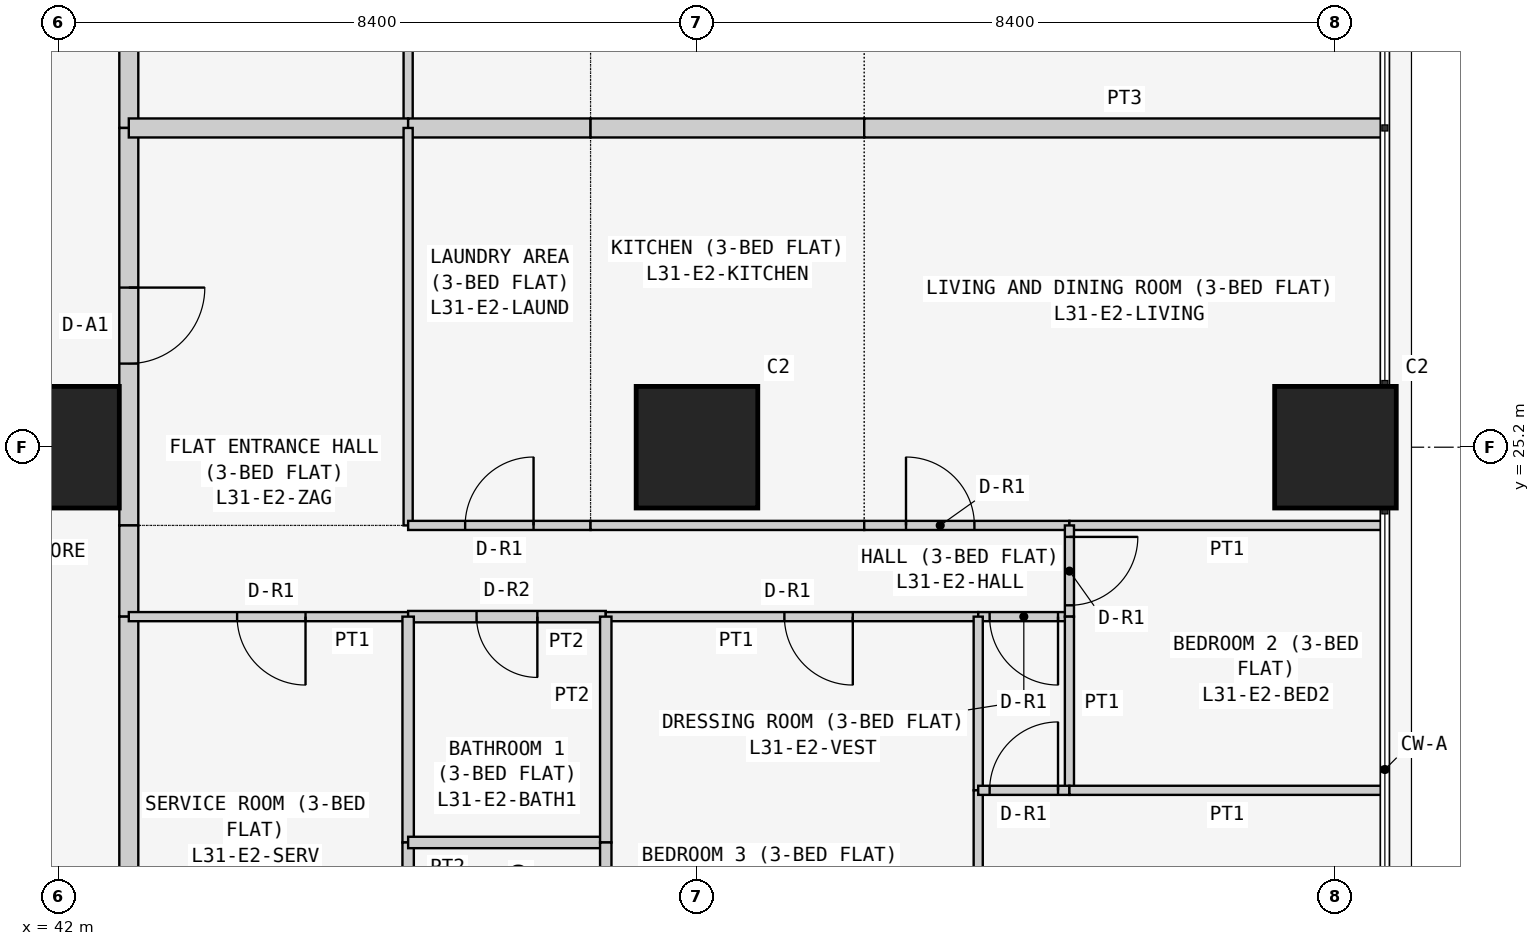
"""IFC4 building model, lengths in metres.
Left out: names, types, materials, properties, quantities, classifications, styles, units other than length and angle.
Written with IfcOpenShell. Run it as: python <this file> out.ifc"""

import sys

from ifc_helpers import new_model, si_unit, direction, frame, frame_2d, origin, origin_2d, place, context, subcontext, project, spatial, rectangle, extrude, element, fill, save


model = new_model("IFC4")
c1 = context("Model", 3, precision=1e-05, world=origin(), true_north=direction((0.0, 1.0)))
c2 = subcontext(c1, "Body", "Model", "MODEL_VIEW")
j1 = project(units=[si_unit("LENGTHUNIT", "METRE"), si_unit("PLANEANGLEUNIT", "RADIAN")], contexts=[c1])
p1 = place(None, origin())
s1 = spatial("IfcSite", under=j1, at=p1, CompositionType="ELEMENT")
p2 = place(p1, origin())
s2 = spatial("IfcBuilding", under=s1, at=p2, CompositionType="ELEMENT")
p3 = place(p2, frame((0.0, 0.0, 123.3)))
s3 = spatial("IfcBuildingStorey", under=s2, at=p3, CompositionType="ELEMENT", Elevation=123.3)
for number, where, z_axis, x_axis in (
    (1, (42.0, 25.2, 0.0), (0.0, 0.0, 1.0), (1.0, 0.0, 0.0)),
    (2, (50.4, 25.2, 0.0), (0.0, 0.0, 1.0), (1.0, 0.0, 0.0)),
    (3, (58.8, 25.2, 0.0), (0.0, 0.0, 1.0), (1.0, 0.0, 0.0)),
):
    element("IfcColumn", number, at=place(p3, frame(where, z_axis=z_axis, x_axis=x_axis)), inside=s3, PredefinedType="COLUMN", context=c2, shape_type="SweptSolid", body=[
        extrude(rectangle(XDim=1.6, YDim=1.6, at=origin_2d()), origin(), (0.0, 0.0, 1.0), 3.6),
    ])
p4 = place(p3, frame((42.925, 34.629, 0.0), z_axis=(0.0, 0.0, 1.0), x_axis=(0.0, -1.0, 0.0)))
e4 = element("IfcWall", 4, at=p4, inside=s3, PredefinedType="PARTITIONING", context=c2, shape_type="SweptSolid", body=[
    extrude(rectangle(XDim=5.229, YDim=0.25, at=frame_2d((2.615, 0.0))), origin(), (0.0, 0.0, 1.0), 3.45),
])
p5 = place(p4, frame((2.129, 0.0, 0.0)))
e5 = element("IfcOpeningElement", 5, at=p5, cuts=e4, PredefinedType="OPENING", context=c2, shape_type="SweptSolid", body=[
    extrude(rectangle(XDim=1.0, YDim=2.1, at=frame_2d((0.5, 1.05))), frame((0.0, 0.135, 0.0), z_axis=(0.0, -1.0, 0.0), x_axis=(1.0, 0.0, 0.0)), (0.0, 0.0, 1.0), 0.27),
])
p6 = place(p3, frame((42.925, 29.4, 0.0), z_axis=(0.0, 0.0, 1.0), x_axis=(0.0, -1.0, 0.0)))
e6 = element("IfcWall", 6, at=p6, inside=s3, PredefinedType="PARTITIONING", context=c2, shape_type="SweptSolid", body=[
    extrude(rectangle(XDim=5.229, YDim=0.25, at=frame_2d((2.615, 0.0))), origin(), (0.0, 0.0, 1.0), 3.45),
])
p7 = place(p6, frame((2.1, 0.0, 0.0)))
e7 = element("IfcOpeningElement", 7, at=p7, cuts=e6, PredefinedType="OPENING", context=c2, shape_type="SweptSolid", body=[
    extrude(rectangle(XDim=1.0, YDim=2.1, at=frame_2d((0.5, 1.05))), frame((0.0, 0.135, 0.0), z_axis=(0.0, -1.0, 0.0), x_axis=(1.0, 0.0, 0.0)), (0.0, 0.0, 1.0), 0.27),
])
p8 = place(p3, frame((42.925, 24.171, 0.0), z_axis=(0.0, 0.0, 1.0), x_axis=(0.0, -1.0, 0.0)))
e8 = element("IfcWall", 8, at=p8, inside=s3, PredefinedType="PARTITIONING", context=c2, shape_type="SweptSolid", body=[
    extrude(rectangle(XDim=1.2, YDim=0.25, at=frame_2d((0.6, 0.0))), origin(), (0.0, 0.0, 1.0), 3.45),
])
p9 = place(p3, frame((42.925, 22.971, 0.0), z_axis=(0.0, 0.0, 1.0), x_axis=(0.0, -1.0, 0.0)))
e9 = element("IfcWall", 9, at=p9, inside=s3, PredefinedType="PARTITIONING", context=c2, shape_type="SweptSolid", body=[
    extrude(rectangle(XDim=6.871, YDim=0.25, at=frame_2d((3.436, 0.0))), origin(), (0.0, 0.0, 1.0), 3.45),
])
p10 = place(p3, frame((46.6, 29.4, 0.0), z_axis=(0.0, 0.0, 1.0), x_axis=(0.0, 1.0, 0.0)))
e10 = element("IfcWall", 10, at=p10, inside=s3, PredefinedType="PARTITIONING", context=c2, shape_type="SweptSolid", body=[
    extrude(rectangle(XDim=5.229, YDim=0.12, at=frame_2d((2.615, 0.0))), origin(), (0.0, 0.0, 1.0), 3.45),
])
p11 = place(p3, frame((42.925, 29.4, 0.0), z_axis=(0.0, 0.0, 1.0), x_axis=(1.0, 0.0, 0.0)))
e11 = element("IfcWall", 11, at=p11, inside=s3, PredefinedType="PARTITIONING", context=c2, shape_type="SweptSolid", body=[
    extrude(rectangle(XDim=3.675, YDim=0.25, at=frame_2d((1.837, 0.0))), origin(), (0.0, 0.0, 1.0), 3.45),
])
p12 = place(p3, frame((46.6, 29.4, 0.0), z_axis=(0.0, 0.0, 1.0), x_axis=(1.0, 0.0, 0.0)))
e12 = element("IfcWall", 12, at=p12, inside=s3, PredefinedType="PARTITIONING", context=c2, shape_type="SweptSolid", body=[
    extrude(rectangle(XDim=2.4, YDim=0.25, at=frame_2d((1.2, 0.0))), origin(), (0.0, 0.0, 1.0), 3.45),
])
p13 = place(p3, frame((49.0, 29.4, 0.0), z_axis=(0.0, 0.0, 1.0), x_axis=(1.0, 0.0, 0.0)))
e13 = element("IfcWall", 13, at=p13, inside=s3, PredefinedType="PARTITIONING", context=c2, shape_type="SweptSolid", body=[
    extrude(rectangle(XDim=3.6, YDim=0.25, at=frame_2d((1.8, 0.0))), origin(), (0.0, 0.0, 1.0), 3.45),
])
p14 = place(p3, frame((52.6, 29.4, 0.0), z_axis=(0.0, 0.0, 1.0), x_axis=(1.0, 0.0, 0.0)))
e14 = element("IfcWall", 14, at=p14, inside=s3, PredefinedType="PARTITIONING", context=c2, shape_type="SweptSolid", body=[
    extrude(rectangle(XDim=6.85, YDim=0.25, at=frame_2d((3.425, 0.0))), origin(), (0.0, 0.0, 1.0), 3.45),
])
p15 = place(p3, frame((46.6, 29.4, 0.0), z_axis=(0.0, 0.0, 1.0), x_axis=(0.0, -1.0, 0.0)))
e15 = element("IfcWall", 15, at=p15, inside=s3, PredefinedType="PARTITIONING", context=c2, shape_type="SweptSolid", body=[
    extrude(rectangle(XDim=5.229, YDim=0.12, at=frame_2d((2.615, 0.0))), origin(), (0.0, 0.0, 1.0), 3.45),
])
p16 = place(p3, frame((49.0, 24.171, 0.0), z_axis=(0.0, 0.0, 1.0), x_axis=(-1.0, 0.0, 0.0)))
e16 = element("IfcWall", 16, at=p16, inside=s3, PredefinedType="PARTITIONING", context=c2, shape_type="SweptSolid", body=[
    extrude(rectangle(XDim=2.4, YDim=0.12, at=frame_2d((1.2, 0.0))), origin(), (0.0, 0.0, 1.0), 3.45),
])
p17 = place(p16, frame((0.75, 0.0, 0.0)))
e17 = element("IfcOpeningElement", 17, at=p17, cuts=e16, PredefinedType="OPENING", context=c2, shape_type="SweptSolid", body=[
    extrude(rectangle(XDim=0.9, YDim=2.1, at=frame_2d((0.45, 1.05))), frame((0.0, 0.07, 0.0), z_axis=(0.0, -1.0, 0.0), x_axis=(1.0, 0.0, 0.0)), (0.0, 0.0, 1.0), 0.14),
])
p18 = place(p3, frame((52.6, 24.171, 0.0), z_axis=(0.0, 0.0, 1.0), x_axis=(-1.0, 0.0, 0.0)))
e18 = element("IfcWall", 18, at=p18, inside=s3, PredefinedType="PARTITIONING", context=c2, shape_type="SweptSolid", body=[
    extrude(rectangle(XDim=3.6, YDim=0.12, at=frame_2d((1.8, 0.0))), origin(), (0.0, 0.0, 1.0), 3.45),
])
p19 = place(p3, frame((55.3, 24.171, 0.0), z_axis=(0.0, 0.0, 1.0), x_axis=(-1.0, 0.0, 0.0)))
e19 = element("IfcWall", 19, at=p19, inside=s3, PredefinedType="PARTITIONING", context=c2, shape_type="SweptSolid", body=[
    extrude(rectangle(XDim=2.7, YDim=0.12, at=frame_2d((1.35, 0.0))), origin(), (0.0, 0.0, 1.0), 3.45),
])
p20 = place(p19, frame((1.25, 0.0, 0.0)))
e20 = element("IfcOpeningElement", 20, at=p20, cuts=e19, PredefinedType="OPENING", context=c2, shape_type="SweptSolid", body=[
    extrude(rectangle(XDim=0.9, YDim=2.1, at=frame_2d((0.45, 1.05))), frame((0.0, 0.07, 0.0), z_axis=(0.0, -1.0, 0.0), x_axis=(1.0, 0.0, 0.0)), (0.0, 0.0, 1.0), 0.14),
])
p21 = place(p3, frame((59.45, 24.171, 0.0), z_axis=(0.0, 0.0, 1.0), x_axis=(-1.0, 0.0, 0.0)))
e21 = element("IfcWall", 21, at=p21, inside=s3, PredefinedType="PARTITIONING", context=c2, shape_type="SweptSolid", body=[
    extrude(rectangle(XDim=4.15, YDim=0.12, at=frame_2d((2.075, 0.0))), origin(), (0.0, 0.0, 1.0), 3.45),
])
p22 = place(p3, frame((46.6, 22.971, 0.0), z_axis=(0.0, 0.0, 1.0), x_axis=(-1.0, 0.0, 0.0)))
e22 = element("IfcWall", 22, at=p22, inside=s3, PredefinedType="PARTITIONING", context=c2, shape_type="SweptSolid", body=[
    extrude(rectangle(XDim=3.675, YDim=0.12, at=frame_2d((1.837, 0.0))), origin(), (0.0, 0.0, 1.0), 3.45),
])
p23 = place(p22, frame((1.35, 0.0, 0.0)))
e23 = element("IfcOpeningElement", 23, at=p23, cuts=e22, PredefinedType="OPENING", context=c2, shape_type="SweptSolid", body=[
    extrude(rectangle(XDim=0.9, YDim=2.1, at=frame_2d((0.45, 1.05))), frame((0.0, 0.07, 0.0), z_axis=(0.0, -1.0, 0.0), x_axis=(1.0, 0.0, 0.0)), (0.0, 0.0, 1.0), 0.14),
])
p24 = place(p3, frame((49.2, 22.971, 0.0), z_axis=(0.0, 0.0, 1.0), x_axis=(-1.0, 0.0, 0.0)))
e24 = element("IfcWall", 24, at=p24, inside=s3, PredefinedType="PARTITIONING", context=c2, shape_type="SweptSolid", body=[
    extrude(rectangle(XDim=2.6, YDim=0.15, at=frame_2d((1.3, 0.0))), origin(), (0.0, 0.0, 1.0), 3.45),
])
p25 = place(p24, frame((0.9, 0.0, 0.0)))
e25 = element("IfcOpeningElement", 25, at=p25, cuts=e24, PredefinedType="OPENING", context=c2, shape_type="SweptSolid", body=[
    extrude(rectangle(XDim=0.8, YDim=2.1, at=frame_2d((0.4, 1.05))), frame((0.0, 0.085, 0.0), z_axis=(0.0, -1.0, 0.0), x_axis=(1.0, 0.0, 0.0)), (0.0, 0.0, 1.0), 0.17),
])
p26 = place(p3, frame((54.1, 22.971, 0.0), z_axis=(0.0, 0.0, 1.0), x_axis=(-1.0, 0.0, 0.0)))
e26 = element("IfcWall", 26, at=p26, inside=s3, PredefinedType="PARTITIONING", context=c2, shape_type="SweptSolid", body=[
    extrude(rectangle(XDim=4.9, YDim=0.12, at=frame_2d((2.45, 0.0))), origin(), (0.0, 0.0, 1.0), 3.45),
])
p27 = place(p26, frame((1.65, 0.0, 0.0)))
e27 = element("IfcOpeningElement", 27, at=p27, cuts=e26, PredefinedType="OPENING", context=c2, shape_type="SweptSolid", body=[
    extrude(rectangle(XDim=0.9, YDim=2.1, at=frame_2d((0.45, 1.05))), frame((0.0, 0.07, 0.0), z_axis=(0.0, -1.0, 0.0), x_axis=(1.0, 0.0, 0.0)), (0.0, 0.0, 1.0), 0.14),
])
p28 = place(p3, frame((55.3, 22.971, 0.0), z_axis=(0.0, 0.0, 1.0), x_axis=(-1.0, 0.0, 0.0)))
e28 = element("IfcWall", 28, at=p28, inside=s3, PredefinedType="PARTITIONING", context=c2, shape_type="SweptSolid", body=[
    extrude(rectangle(XDim=1.2, YDim=0.12, at=frame_2d((0.6, 0.0))), origin(), (0.0, 0.0, 1.0), 3.45),
])
p29 = place(p28, frame((0.15, 0.0, 0.0)))
e29 = element("IfcOpeningElement", 29, at=p29, cuts=e28, PredefinedType="OPENING", context=c2, shape_type="SweptSolid", body=[
    extrude(rectangle(XDim=0.9, YDim=2.1, at=frame_2d((0.45, 1.05))), frame((0.0, 0.07, 0.0), z_axis=(0.0, -1.0, 0.0), x_axis=(1.0, 0.0, 0.0)), (0.0, 0.0, 1.0), 0.14),
])
p30 = place(p3, frame((55.3, 24.171, 0.0), z_axis=(0.0, 0.0, 1.0), x_axis=(0.0, -1.0, 0.0)))
e30 = element("IfcWall", 30, at=p30, inside=s3, PredefinedType="PARTITIONING", context=c2, shape_type="SweptSolid", body=[
    extrude(rectangle(XDim=1.2, YDim=0.12, at=frame_2d((0.6, 0.0))), origin(), (0.0, 0.0, 1.0), 3.45),
])
p31 = place(p30, frame((0.151, 0.0, 0.0)))
e31 = element("IfcOpeningElement", 31, at=p31, cuts=e30, PredefinedType="OPENING", context=c2, shape_type="SweptSolid", body=[
    extrude(rectangle(XDim=0.9, YDim=2.1, at=frame_2d((0.45, 1.05))), frame((0.0, 0.07, 0.0), z_axis=(0.0, -1.0, 0.0), x_axis=(1.0, 0.0, 0.0)), (0.0, 0.0, 1.0), 0.14),
])
p32 = place(p3, frame((46.6, 22.971, 0.0), z_axis=(0.0, 0.0, 1.0), x_axis=(0.0, -1.0, 0.0)))
e32 = element("IfcWall", 32, at=p32, inside=s3, PredefinedType="PARTITIONING", context=c2, shape_type="SweptSolid", body=[
    extrude(rectangle(XDim=2.971, YDim=0.15, at=frame_2d((1.485, 0.0))), origin(), (0.0, 0.0, 1.0), 3.45),
])
p33 = place(p3, frame((46.6, 20.0, 0.0), z_axis=(0.0, 0.0, 1.0), x_axis=(0.0, -1.0, 0.0)))
e33 = element("IfcWall", 33, at=p33, inside=s3, PredefinedType="PARTITIONING", context=c2, shape_type="SweptSolid", body=[
    extrude(rectangle(XDim=3.9, YDim=0.15, at=frame_2d((1.95, 0.0))), origin(), (0.0, 0.0, 1.0), 3.45),
])
p34 = place(p33, frame((1.45, 0.0, 0.0)))
e34 = element("IfcOpeningElement", 34, at=p34, cuts=e33, PredefinedType="OPENING", context=c2, shape_type="SweptSolid", body=[
    extrude(rectangle(XDim=0.8, YDim=2.1, at=frame_2d((0.4, 1.05))), frame((0.0, 0.085, 0.0), z_axis=(0.0, -1.0, 0.0), x_axis=(1.0, 0.0, 0.0)), (0.0, 0.0, 1.0), 0.17),
])
p35 = place(p3, frame((49.2, 20.0, 0.0), z_axis=(0.0, 0.0, 1.0), x_axis=(-1.0, 0.0, 0.0)))
e35 = element("IfcWall", 35, at=p35, inside=s3, PredefinedType="PARTITIONING", context=c2, shape_type="SweptSolid", body=[
    extrude(rectangle(XDim=2.6, YDim=0.15, at=frame_2d((1.3, 0.0))), origin(), (0.0, 0.0, 1.0), 3.45),
])
p36 = place(p3, frame((49.2, 22.971, 0.0), z_axis=(0.0, 0.0, 1.0), x_axis=(0.0, -1.0, 0.0)))
e36 = element("IfcWall", 36, at=p36, inside=s3, PredefinedType="PARTITIONING", context=c2, shape_type="SweptSolid", body=[
    extrude(rectangle(XDim=2.971, YDim=0.15, at=frame_2d((1.485, 0.0))), origin(), (0.0, 0.0, 1.0), 3.45),
])
p37 = place(p3, frame((49.2, 20.0, 0.0), z_axis=(0.0, 0.0, 1.0), x_axis=(0.0, -1.0, 0.0)))
e37 = element("IfcWall", 37, at=p37, inside=s3, PredefinedType="PARTITIONING", context=c2, shape_type="SweptSolid", body=[
    extrude(rectangle(XDim=3.9, YDim=0.15, at=frame_2d((1.95, 0.0))), origin(), (0.0, 0.0, 1.0), 3.45),
])
p38 = place(p3, frame((54.1, 22.971, 0.0), z_axis=(0.0, 0.0, 1.0), x_axis=(0.0, -1.0, 0.0)))
e38 = element("IfcWall", 38, at=p38, inside=s3, PredefinedType="PARTITIONING", context=c2, shape_type="SweptSolid", body=[
    extrude(rectangle(XDim=2.285, YDim=0.12, at=frame_2d((1.143, 0.0))), origin(), (0.0, 0.0, 1.0), 3.45),
])
p39 = place(p3, frame((54.1, 20.686, 0.0), z_axis=(0.0, 0.0, 1.0), x_axis=(0.0, -1.0, 0.0)))
e39 = element("IfcWall", 39, at=p39, inside=s3, PredefinedType="PARTITIONING", context=c2, shape_type="SweptSolid", body=[
    extrude(rectangle(XDim=4.586, YDim=0.12, at=frame_2d((2.293, 0.0))), origin(), (0.0, 0.0, 1.0), 3.45),
])
p40 = place(p3, frame((55.3, 22.971, 0.0), z_axis=(0.0, 0.0, 1.0), x_axis=(0.0, -1.0, 0.0)))
e40 = element("IfcWall", 40, at=p40, inside=s3, PredefinedType="PARTITIONING", context=c2, shape_type="SweptSolid", body=[
    extrude(rectangle(XDim=2.285, YDim=0.12, at=frame_2d((1.143, 0.0))), origin(), (0.0, 0.0, 1.0), 3.45),
])
p41 = place(p3, frame((55.3, 20.686, 0.0), z_axis=(0.0, 0.0, 1.0), x_axis=(-1.0, 0.0, 0.0)))
e41 = element("IfcWall", 41, at=p41, inside=s3, PredefinedType="PARTITIONING", context=c2, shape_type="SweptSolid", body=[
    extrude(rectangle(XDim=1.2, YDim=0.12, at=frame_2d((0.6, 0.0))), origin(), (0.0, 0.0, 1.0), 3.45),
])
p42 = place(p41, frame((0.15, 0.0, 0.0)))
e42 = element("IfcOpeningElement", 42, at=p42, cuts=e41, PredefinedType="OPENING", context=c2, shape_type="SweptSolid", body=[
    extrude(rectangle(XDim=0.9, YDim=2.1, at=frame_2d((0.45, 1.05))), frame((0.0, 0.07, 0.0), z_axis=(0.0, -1.0, 0.0), x_axis=(1.0, 0.0, 0.0)), (0.0, 0.0, 1.0), 0.14),
])
p43 = place(p3, frame((59.45, 20.686, 0.0), z_axis=(0.0, 0.0, 1.0), x_axis=(-1.0, 0.0, 0.0)))
e43 = element("IfcWall", 43, at=p43, inside=s3, PredefinedType="PARTITIONING", context=c2, shape_type="SweptSolid", body=[
    extrude(rectangle(XDim=4.15, YDim=0.12, at=frame_2d((2.075, 0.0))), origin(), (0.0, 0.0, 1.0), 3.45),
])
p44 = place(p7, origin())
e44 = element("IfcDoor", 44, at=p44, inside=s3, OperationType="SINGLE_SWING_LEFT", PredefinedType="DOOR", context=c2, shape_type="SweptSolid", body=[
    extrude(rectangle(XDim=1.0, YDim=2.1, at=frame_2d((0.5, 1.05))), frame((0.0, 0.025, 0.0), z_axis=(0.0, -1.0, 0.0), x_axis=(1.0, 0.0, 0.0)), (0.0, 0.0, 1.0), 0.05),
])
fill(e7, e44)
p45 = place(p17, frame((0.9, 0.0, 0.0), z_axis=(0.0, 0.0, 1.0), x_axis=(-1.0, 0.0, 0.0)))
e45 = element("IfcDoor", 45, at=p45, inside=s3, OperationType="SINGLE_SWING_RIGHT", PredefinedType="DOOR", context=c2, shape_type="SweptSolid", body=[
    extrude(rectangle(XDim=0.9, YDim=2.1, at=frame_2d((0.45, 1.05))), frame((0.0, 0.025, 0.0), z_axis=(0.0, -1.0, 0.0), x_axis=(1.0, 0.0, 0.0)), (0.0, 0.0, 1.0), 0.05),
])
fill(e17, e45)
p46 = place(p20, frame((0.9, 0.0, 0.0), z_axis=(0.0, 0.0, 1.0), x_axis=(-1.0, 0.0, 0.0)))
e46 = element("IfcDoor", 46, at=p46, inside=s3, OperationType="SINGLE_SWING_LEFT", PredefinedType="DOOR", context=c2, shape_type="SweptSolid", body=[
    extrude(rectangle(XDim=0.9, YDim=2.1, at=frame_2d((0.45, 1.05))), frame((0.0, 0.025, 0.0), z_axis=(0.0, -1.0, 0.0), x_axis=(1.0, 0.0, 0.0)), (0.0, 0.0, 1.0), 0.05),
])
fill(e20, e46)
p47 = place(p23, origin())
e47 = element("IfcDoor", 47, at=p47, inside=s3, OperationType="SINGLE_SWING_LEFT", PredefinedType="DOOR", context=c2, shape_type="SweptSolid", body=[
    extrude(rectangle(XDim=0.9, YDim=2.1, at=frame_2d((0.45, 1.05))), frame((0.0, 0.025, 0.0), z_axis=(0.0, -1.0, 0.0), x_axis=(1.0, 0.0, 0.0)), (0.0, 0.0, 1.0), 0.05),
])
fill(e23, e47)
p48 = place(p25, origin())
e48 = element("IfcDoor", 48, at=p48, inside=s3, OperationType="SINGLE_SWING_LEFT", PredefinedType="DOOR", context=c2, shape_type="SweptSolid", body=[
    extrude(rectangle(XDim=0.8, YDim=2.1, at=frame_2d((0.4, 1.05))), frame((0.0, 0.025, 0.0), z_axis=(0.0, -1.0, 0.0), x_axis=(1.0, 0.0, 0.0)), (0.0, 0.0, 1.0), 0.05),
])
fill(e25, e48)
p49 = place(p27, origin())
e49 = element("IfcDoor", 49, at=p49, inside=s3, OperationType="SINGLE_SWING_LEFT", PredefinedType="DOOR", context=c2, shape_type="SweptSolid", body=[
    extrude(rectangle(XDim=0.9, YDim=2.1, at=frame_2d((0.45, 1.05))), frame((0.0, 0.025, 0.0), z_axis=(0.0, -1.0, 0.0), x_axis=(1.0, 0.0, 0.0)), (0.0, 0.0, 1.0), 0.05),
])
fill(e27, e49)
p50 = place(p29, origin())
e50 = element("IfcDoor", 50, at=p50, inside=s3, OperationType="SINGLE_SWING_LEFT", PredefinedType="DOOR", context=c2, shape_type="SweptSolid", body=[
    extrude(rectangle(XDim=0.9, YDim=2.1, at=frame_2d((0.45, 1.05))), frame((0.0, 0.025, 0.0), z_axis=(0.0, -1.0, 0.0), x_axis=(1.0, 0.0, 0.0)), (0.0, 0.0, 1.0), 0.05),
])
fill(e29, e50)
p51 = place(p42, frame((0.9, 0.0, 0.0), z_axis=(0.0, 0.0, 1.0), x_axis=(-1.0, 0.0, 0.0)))
e51 = element("IfcDoor", 51, at=p51, inside=s3, OperationType="SINGLE_SWING_RIGHT", PredefinedType="DOOR", context=c2, shape_type="SweptSolid", body=[
    extrude(rectangle(XDim=0.9, YDim=2.1, at=frame_2d((0.45, 1.05))), frame((0.0, 0.025, 0.0), z_axis=(0.0, -1.0, 0.0), x_axis=(1.0, 0.0, 0.0)), (0.0, 0.0, 1.0), 0.05),
])
fill(e42, e51)
p52 = place(p31, origin())
e52 = element("IfcDoor", 52, at=p52, inside=s3, OperationType="SINGLE_SWING_LEFT", PredefinedType="DOOR", context=c2, shape_type="SweptSolid", body=[
    extrude(rectangle(XDim=0.9, YDim=2.1, at=frame_2d((0.45, 1.05))), frame((0.0, 0.025, 0.0), z_axis=(0.0, -1.0, 0.0), x_axis=(1.0, 0.0, 0.0)), (0.0, 0.0, 1.0), 0.05),
])
fill(e31, e52)
save(model, sys.argv[1])
